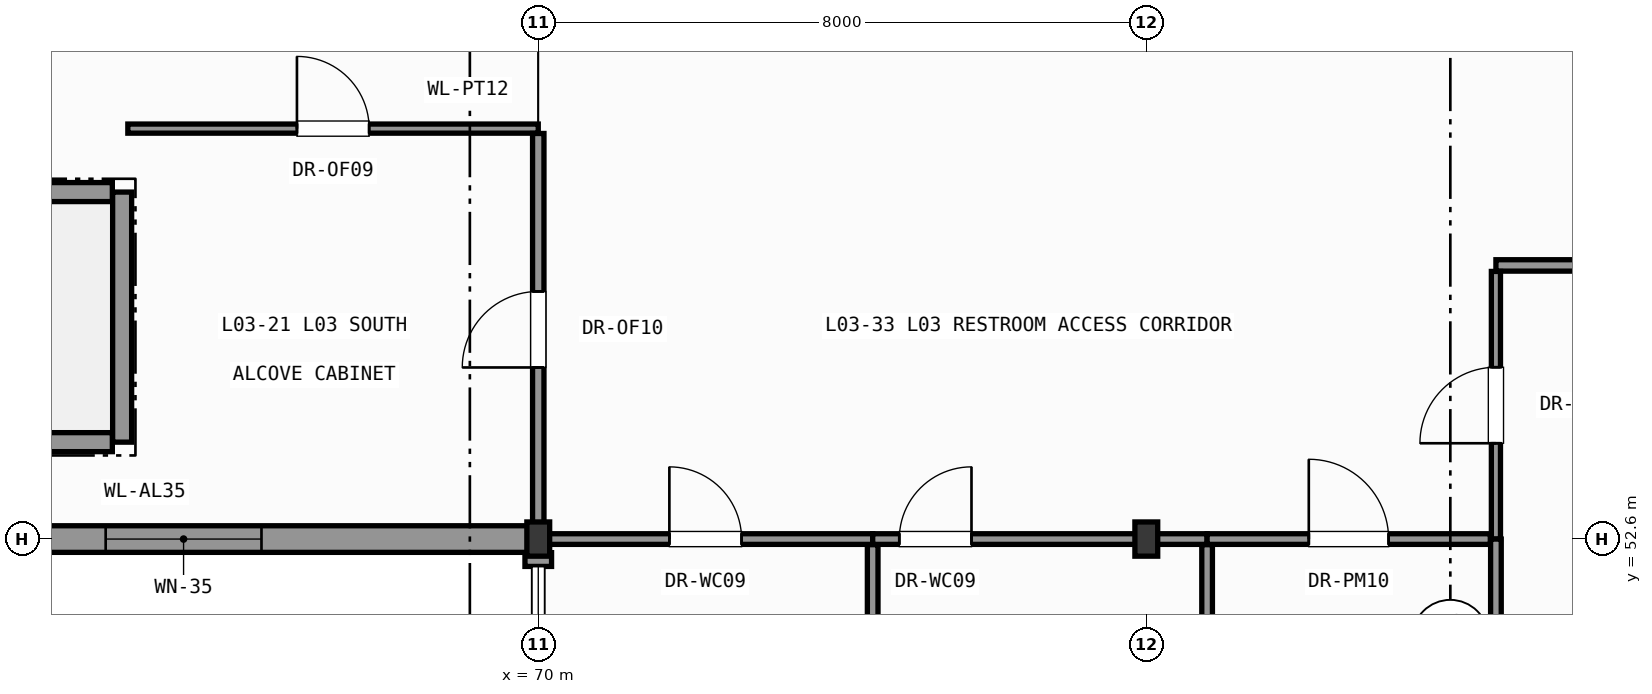
"""IFC4 building model, lengths in metres.
Left out: names, types, materials, properties, quantities, classifications, styles, units other than length and angle.
Written with IfcOpenShell. Run it as: python <this file> out.ifc"""

import sys

from ifc_helpers import new_model, si_unit, direction, frame, frame_2d, origin, origin_2d, place, context, subcontext, project, spatial, rectangle, i_section, extrude, element, fill, save


model = new_model("IFC4")
c1 = context("Model", 3, precision=1e-05, world=origin(), true_north=direction((0.0, 1.0)))
c2 = subcontext(c1, "Body", "Model", "MODEL_VIEW")
j1 = project(units=[si_unit("LENGTHUNIT", "METRE"), si_unit("PLANEANGLEUNIT", "RADIAN")], contexts=[c1])
p1 = place(None, origin())
s1 = spatial("IfcSite", under=j1, at=p1, CompositionType="ELEMENT")
p2 = place(p1, origin())
s2 = spatial("IfcBuilding", under=s1, at=p2, CompositionType="ELEMENT")
p3 = place(p2, frame((0.0, 0.0, 13.2)))
s3 = spatial("IfcBuildingStorey", under=s2, at=p3, CompositionType="ELEMENT", Elevation=13.2)
for number, where, z_axis, x_axis in (
    (1, (70.0, 52.6, 0.0), (0.0, 0.0, 1.0), (1.0, 0.0, 0.0)),
    (2, (78.0, 52.6, 0.0), (0.0, 0.0, 1.0), (1.0, 0.0, 0.0)),
):
    element("IfcColumn", number, at=place(p3, frame(where, z_axis=z_axis, x_axis=x_axis)), inside=s3, PredefinedType="COLUMN", context=c2, shape_type="SweptSolid", body=[
        extrude(i_section(OverallWidth=0.3, OverallDepth=0.45, WebThickness=0.014, FlangeThickness=0.026, FilletRadius=0.027, at=origin_2d()), origin(), (0.0, 0.0, 1.0), 4.8),
    ])
p4 = place(p3, frame((70.0, 52.6, 0.0), z_axis=(0.0, 0.0, 1.0), x_axis=(-1.0, 0.0, 0.0)))
e3 = element("IfcWall", 3, at=p4, inside=s3, PredefinedType="SOLIDWALL", context=c2, shape_type="SweptSolid", body=[
    extrude(rectangle(XDim=14.0, YDim=0.35, at=frame_2d((7.0, 0.0))), origin(), (0.0, 0.0, 1.0), 3.995),
])
p5 = place(p4, frame((3.642, 0.0, 0.95)))
e4 = element("IfcOpeningElement", 4, at=p5, cuts=e3, PredefinedType="OPENING", context=c2, shape_type="SweptSolid", body=[
    extrude(rectangle(XDim=2.05, YDim=2.65, at=frame_2d((1.025, 1.325))), frame((0.0, 0.185, 0.0), z_axis=(0.0, -1.0, 0.0), x_axis=(1.0, 0.0, 0.0)), (0.0, 0.0, 1.0), 0.37),
])
p6 = place(p4, frame((8.308, 0.0, 0.95)))
e5 = element("IfcOpeningElement", 5, at=p6, cuts=e3, PredefinedType="OPENING", context=c2, shape_type="SweptSolid", body=[
    extrude(rectangle(XDim=2.05, YDim=2.65, at=frame_2d((1.025, 1.325))), frame((0.0, 0.185, 0.0), z_axis=(0.0, -1.0, 0.0), x_axis=(1.0, 0.0, 0.0)), (0.0, 0.0, 1.0), 0.37),
])
p7 = place(p3, frame((70.0, 52.421, 0.0), z_axis=(0.0, 0.0, 1.0), x_axis=(0.0, -1.0, 0.0)))
e6 = element("IfcWall", 6, at=p7, inside=s3, PredefinedType="SOLIDWALL", context=c2, shape_type="SweptSolid", body=[
    extrude(rectangle(XDim=0.181, YDim=0.35, at=frame_2d((0.09, 0.0))), origin(), (0.0, 0.0, 1.0), 4.56),
])
p8 = place(p3, frame((64.525, 53.875, 0.0), z_axis=(0.0, 0.0, 1.0), x_axis=(0.0, 1.0, 0.0)))
e7 = element("IfcWall", 7, at=p8, inside=s3, PredefinedType="SHEAR", context=c2, shape_type="SweptSolid", body=[
    extrude(rectangle(XDim=3.29, YDim=0.25, at=frame_2d((1.645, 0.0))), origin(), (0.0, 0.0, 1.0), 4.56),
])
for number, where, z_axis, x_axis in (
    (8, (57.204, 53.875, 0.0), (0.0, 0.0, 1.0), (1.0, 0.0, 0.0)),
    (9, (57.204, 57.165, 0.0), (0.0, 0.0, 1.0), (1.0, 0.0, 0.0)),
):
    element("IfcWall", number, at=place(p3, frame(where, z_axis=z_axis, x_axis=x_axis)), inside=s3, PredefinedType="SHEAR", context=c2, shape_type="SweptSolid", body=[
        extrude(rectangle(XDim=7.192, YDim=0.25, at=frame_2d((3.596, 0.0))), origin(), (0.0, 0.0, 1.0), 4.56),
    ])
p9 = place(p3, frame((64.6, 58.0, 0.0), z_axis=(0.0, 0.0, 1.0), x_axis=(1.0, 0.0, 0.0)))
e10 = element("IfcWall", 10, at=p9, inside=s3, PredefinedType="PARTITIONING", context=c2, shape_type="SweptSolid", body=[
    extrude(rectangle(XDim=5.4, YDim=0.12, at=frame_2d((2.7, 0.0))), origin(), (0.0, 0.0, 1.0), 4.56),
])
p10 = place(p9, frame((2.225, 0.0, 0.0)))
e11 = element("IfcOpeningElement", 11, at=p10, cuts=e10, PredefinedType="OPENING", context=c2, shape_type="SweptSolid", body=[
    extrude(rectangle(XDim=0.95, YDim=2.1, at=frame_2d((0.475, 1.05))), frame((0.0, 0.07, 0.0), z_axis=(0.0, -1.0, 0.0), x_axis=(1.0, 0.0, 0.0)), (0.0, 0.0, 1.0), 0.14),
])
p11 = place(p3, frame((70.0, 52.779, 0.0), z_axis=(0.0, 0.0, 1.0), x_axis=(0.0, 1.0, 0.0)))
e12 = element("IfcWall", 12, at=p11, inside=s3, PredefinedType="PARTITIONING", context=c2, shape_type="SweptSolid", body=[
    extrude(rectangle(XDim=5.157, YDim=0.15, at=frame_2d((2.579, 0.0))), origin(), (0.0, 0.0, 1.0), 4.255),
])
p12 = place(p11, frame((2.079, 0.0, 0.0)))
e13 = element("IfcOpeningElement", 13, at=p12, cuts=e12, PredefinedType="OPENING", context=c2, shape_type="SweptSolid", body=[
    extrude(rectangle(XDim=1.0, YDim=2.15, at=frame_2d((0.5, 1.075))), frame((0.0, 0.085, 0.0), z_axis=(0.0, -1.0, 0.0), x_axis=(1.0, 0.0, 0.0)), (0.0, 0.0, 1.0), 0.17),
])
p13 = place(p3, frame((82.6, 56.2, 0.0), z_axis=(0.0, 0.0, 1.0), x_axis=(1.0, 0.0, 0.0)))
e14 = element("IfcWall", 14, at=p13, inside=s3, PredefinedType="PARTITIONING", context=c2, shape_type="SweptSolid", body=[
    extrude(rectangle(XDim=35.646, YDim=0.15, at=frame_2d((17.823, 0.0))), origin(), (0.0, 0.0, 1.0), 4.185),
])
p14 = place(p13, frame((16.723, 0.0, 0.0)))
e15 = element("IfcOpeningElement", 15, at=p14, cuts=e14, PredefinedType="OPENING", context=c2, shape_type="SweptSolid", body=[
    extrude(rectangle(XDim=2.2, YDim=2.6, at=frame_2d((1.1, 1.3))), frame((0.0, 0.085, 0.0), z_axis=(0.0, -1.0, 0.0), x_axis=(1.0, 0.0, 0.0)), (0.0, 0.0, 1.0), 0.17),
])
p15 = place(p3, frame((82.6, 52.6, 0.0), z_axis=(0.0, 0.0, 1.0), x_axis=(0.0, 1.0, 0.0)))
e16 = element("IfcWall", 16, at=p15, inside=s3, PredefinedType="PARTITIONING", context=c2, shape_type="SweptSolid", body=[
    extrude(rectangle(XDim=3.521, YDim=0.12, at=frame_2d((1.76, 0.0))), origin(), (0.0, 0.0, 1.0), 4.56),
])
p16 = place(p15, frame((1.26, 0.0, 0.0)))
e17 = element("IfcOpeningElement", 17, at=p16, cuts=e16, PredefinedType="OPENING", context=c2, shape_type="SweptSolid", body=[
    extrude(rectangle(XDim=1.0, YDim=2.15, at=frame_2d((0.5, 1.075))), frame((0.0, 0.07, 0.0), z_axis=(0.0, -1.0, 0.0), x_axis=(1.0, 0.0, 0.0)), (0.0, 0.0, 1.0), 0.14),
])
p17 = place(p3, frame((82.6, 45.6, 0.0), z_axis=(0.0, 0.0, 1.0), x_axis=(0.0, 1.0, 0.0)))
e18 = element("IfcWall", 18, at=p17, inside=s3, PredefinedType="PARTITIONING", context=c2, shape_type="SweptSolid", body=[
    extrude(rectangle(XDim=7.0, YDim=0.14, at=frame_2d((3.5, 0.0))), origin(), (0.0, 0.0, 1.0), 4.56),
])
p18 = place(p17, frame((2.975, 0.0, 0.0)))
e19 = element("IfcOpeningElement", 19, at=p18, cuts=e18, PredefinedType="OPENING", context=c2, shape_type="SweptSolid", body=[
    extrude(rectangle(XDim=1.05, YDim=2.15, at=frame_2d((0.525, 1.075))), frame((0.0, 0.08, 0.0), z_axis=(0.0, -1.0, 0.0), x_axis=(1.0, 0.0, 0.0)), (0.0, 0.0, 1.0), 0.16),
])
p19 = place(p3, frame((70.0, 52.6, 0.0), z_axis=(0.0, 0.0, 1.0), x_axis=(1.0, 0.0, 0.0)))
e20 = element("IfcWall", 20, at=p19, inside=s3, PredefinedType="PARTITIONING", context=c2, shape_type="SweptSolid", body=[
    extrude(rectangle(XDim=4.4, YDim=0.14, at=frame_2d((2.2, 0.0))), origin(), (0.0, 0.0, 1.0), 4.185),
])
p20 = place(p19, frame((1.725, 0.0, 0.0)))
e21 = element("IfcOpeningElement", 21, at=p20, cuts=e20, PredefinedType="OPENING", context=c2, shape_type="SweptSolid", body=[
    extrude(rectangle(XDim=0.95, YDim=2.1, at=frame_2d((0.475, 1.05))), frame((0.0, 0.08, 0.0), z_axis=(0.0, -1.0, 0.0), x_axis=(1.0, 0.0, 0.0)), (0.0, 0.0, 1.0), 0.16),
])
p21 = place(p3, frame((74.4, 52.6, 0.0), z_axis=(0.0, 0.0, 1.0), x_axis=(1.0, 0.0, 0.0)))
e22 = element("IfcWall", 22, at=p21, inside=s3, PredefinedType="PARTITIONING", context=c2, shape_type="SweptSolid", body=[
    extrude(rectangle(XDim=4.4, YDim=0.14, at=frame_2d((2.2, 0.0))), origin(), (0.0, 0.0, 1.0), 4.095),
])
p22 = place(p21, frame((0.35, 0.0, 0.0)))
e23 = element("IfcOpeningElement", 23, at=p22, cuts=e22, PredefinedType="OPENING", context=c2, shape_type="SweptSolid", body=[
    extrude(rectangle(XDim=0.95, YDim=2.1, at=frame_2d((0.475, 1.05))), frame((0.0, 0.08, 0.0), z_axis=(0.0, -1.0, 0.0), x_axis=(1.0, 0.0, 0.0)), (0.0, 0.0, 1.0), 0.16),
])
p23 = place(p3, frame((78.8, 52.6, 0.0), z_axis=(0.0, 0.0, 1.0), x_axis=(1.0, 0.0, 0.0)))
e24 = element("IfcWall", 24, at=p23, inside=s3, PredefinedType="PARTITIONING", context=c2, shape_type="SweptSolid", body=[
    extrude(rectangle(XDim=3.726, YDim=0.14, at=frame_2d((1.863, 0.0))), origin(), (0.0, 0.0, 1.0), 4.095),
])
p24 = place(p23, frame((1.338, 0.0, 0.0)))
e25 = element("IfcOpeningElement", 25, at=p24, cuts=e24, PredefinedType="OPENING", context=c2, shape_type="SweptSolid", body=[
    extrude(rectangle(XDim=1.05, YDim=2.15, at=frame_2d((0.525, 1.075))), frame((0.0, 0.08, 0.0), z_axis=(0.0, -1.0, 0.0), x_axis=(1.0, 0.0, 0.0)), (0.0, 0.0, 1.0), 0.16),
])
for number, where, z_axis, x_axis in (
    (26, (74.4, 45.6, 0.0), (0.0, 0.0, 1.0), (0.0, 1.0, 0.0)),
    (27, (78.8, 45.6, 0.0), (0.0, 0.0, 1.0), (0.0, 1.0, 0.0)),
):
    element("IfcWall", number, at=place(p3, frame(where, z_axis=z_axis, x_axis=x_axis)), inside=s3, PredefinedType="PARTITIONING", context=c2, shape_type="SweptSolid", body=[
        extrude(rectangle(XDim=6.926, YDim=0.14, at=frame_2d((3.463, 0.0))), origin(), (0.0, 0.0, 1.0), 4.56),
    ])
p25 = place(p5, origin())
e28 = element("IfcWindow", 28, at=p25, inside=s3, PartitioningType="SINGLE_PANEL", PredefinedType="WINDOW", context=c2, shape_type="SweptSolid", body=[
    extrude(rectangle(XDim=2.05, YDim=2.65, at=frame_2d((1.025, 1.325))), frame((0.0, 0.03, 0.0), z_axis=(0.0, -1.0, 0.0), x_axis=(1.0, 0.0, 0.0)), (0.0, 0.0, 1.0), 0.06),
])
fill(e4, e28)
p26 = place(p10, origin())
e29 = element("IfcDoor", 29, at=p26, inside=s3, OperationType="SINGLE_SWING_LEFT", PredefinedType="DOOR", context=c2, shape_type="SweptSolid", body=[
    extrude(rectangle(XDim=0.95, YDim=2.1, at=frame_2d((0.475, 1.05))), frame((0.0, 0.025, 0.0), z_axis=(0.0, -1.0, 0.0), x_axis=(1.0, 0.0, 0.0)), (0.0, 0.0, 1.0), 0.05),
])
fill(e11, e29)
p27 = place(p12, origin())
e30 = element("IfcDoor", 30, at=p27, inside=s3, OperationType="SINGLE_SWING_LEFT", PredefinedType="DOOR", context=c2, shape_type="SweptSolid", body=[
    extrude(rectangle(XDim=1.0, YDim=2.15, at=frame_2d((0.5, 1.075))), frame((0.0, 0.025, 0.0), z_axis=(0.0, -1.0, 0.0), x_axis=(1.0, 0.0, 0.0)), (0.0, 0.0, 1.0), 0.05),
])
fill(e13, e30)
p28 = place(p16, origin())
e31 = element("IfcDoor", 31, at=p28, inside=s3, OperationType="SINGLE_SWING_LEFT", PredefinedType="DOOR", context=c2, shape_type="SweptSolid", body=[
    extrude(rectangle(XDim=1.0, YDim=2.15, at=frame_2d((0.5, 1.075))), frame((0.0, 0.025, 0.0), z_axis=(0.0, -1.0, 0.0), x_axis=(1.0, 0.0, 0.0)), (0.0, 0.0, 1.0), 0.05),
])
fill(e17, e31)
p29 = place(p20, origin())
e32 = element("IfcDoor", 32, at=p29, inside=s3, OperationType="SINGLE_SWING_LEFT", PredefinedType="DOOR", context=c2, shape_type="SweptSolid", body=[
    extrude(rectangle(XDim=0.95, YDim=2.1, at=frame_2d((0.475, 1.05))), frame((0.0, 0.025, 0.0), z_axis=(0.0, -1.0, 0.0), x_axis=(1.0, 0.0, 0.0)), (0.0, 0.0, 1.0), 0.05),
])
fill(e21, e32)
p30 = place(p22, origin())
e33 = element("IfcDoor", 33, at=p30, inside=s3, OperationType="SINGLE_SWING_RIGHT", PredefinedType="DOOR", context=c2, shape_type="SweptSolid", body=[
    extrude(rectangle(XDim=0.95, YDim=2.1, at=frame_2d((0.475, 1.05))), frame((0.0, 0.025, 0.0), z_axis=(0.0, -1.0, 0.0), x_axis=(1.0, 0.0, 0.0)), (0.0, 0.0, 1.0), 0.05),
])
fill(e23, e33)
p31 = place(p24, origin())
e34 = element("IfcDoor", 34, at=p31, inside=s3, OperationType="SINGLE_SWING_LEFT", PredefinedType="DOOR", context=c2, shape_type="SweptSolid", body=[
    extrude(rectangle(XDim=1.05, YDim=2.15, at=frame_2d((0.525, 1.075))), frame((0.0, 0.025, 0.0), z_axis=(0.0, -1.0, 0.0), x_axis=(1.0, 0.0, 0.0)), (0.0, 0.0, 1.0), 0.05),
])
fill(e25, e34)
save(model, sys.argv[1])
